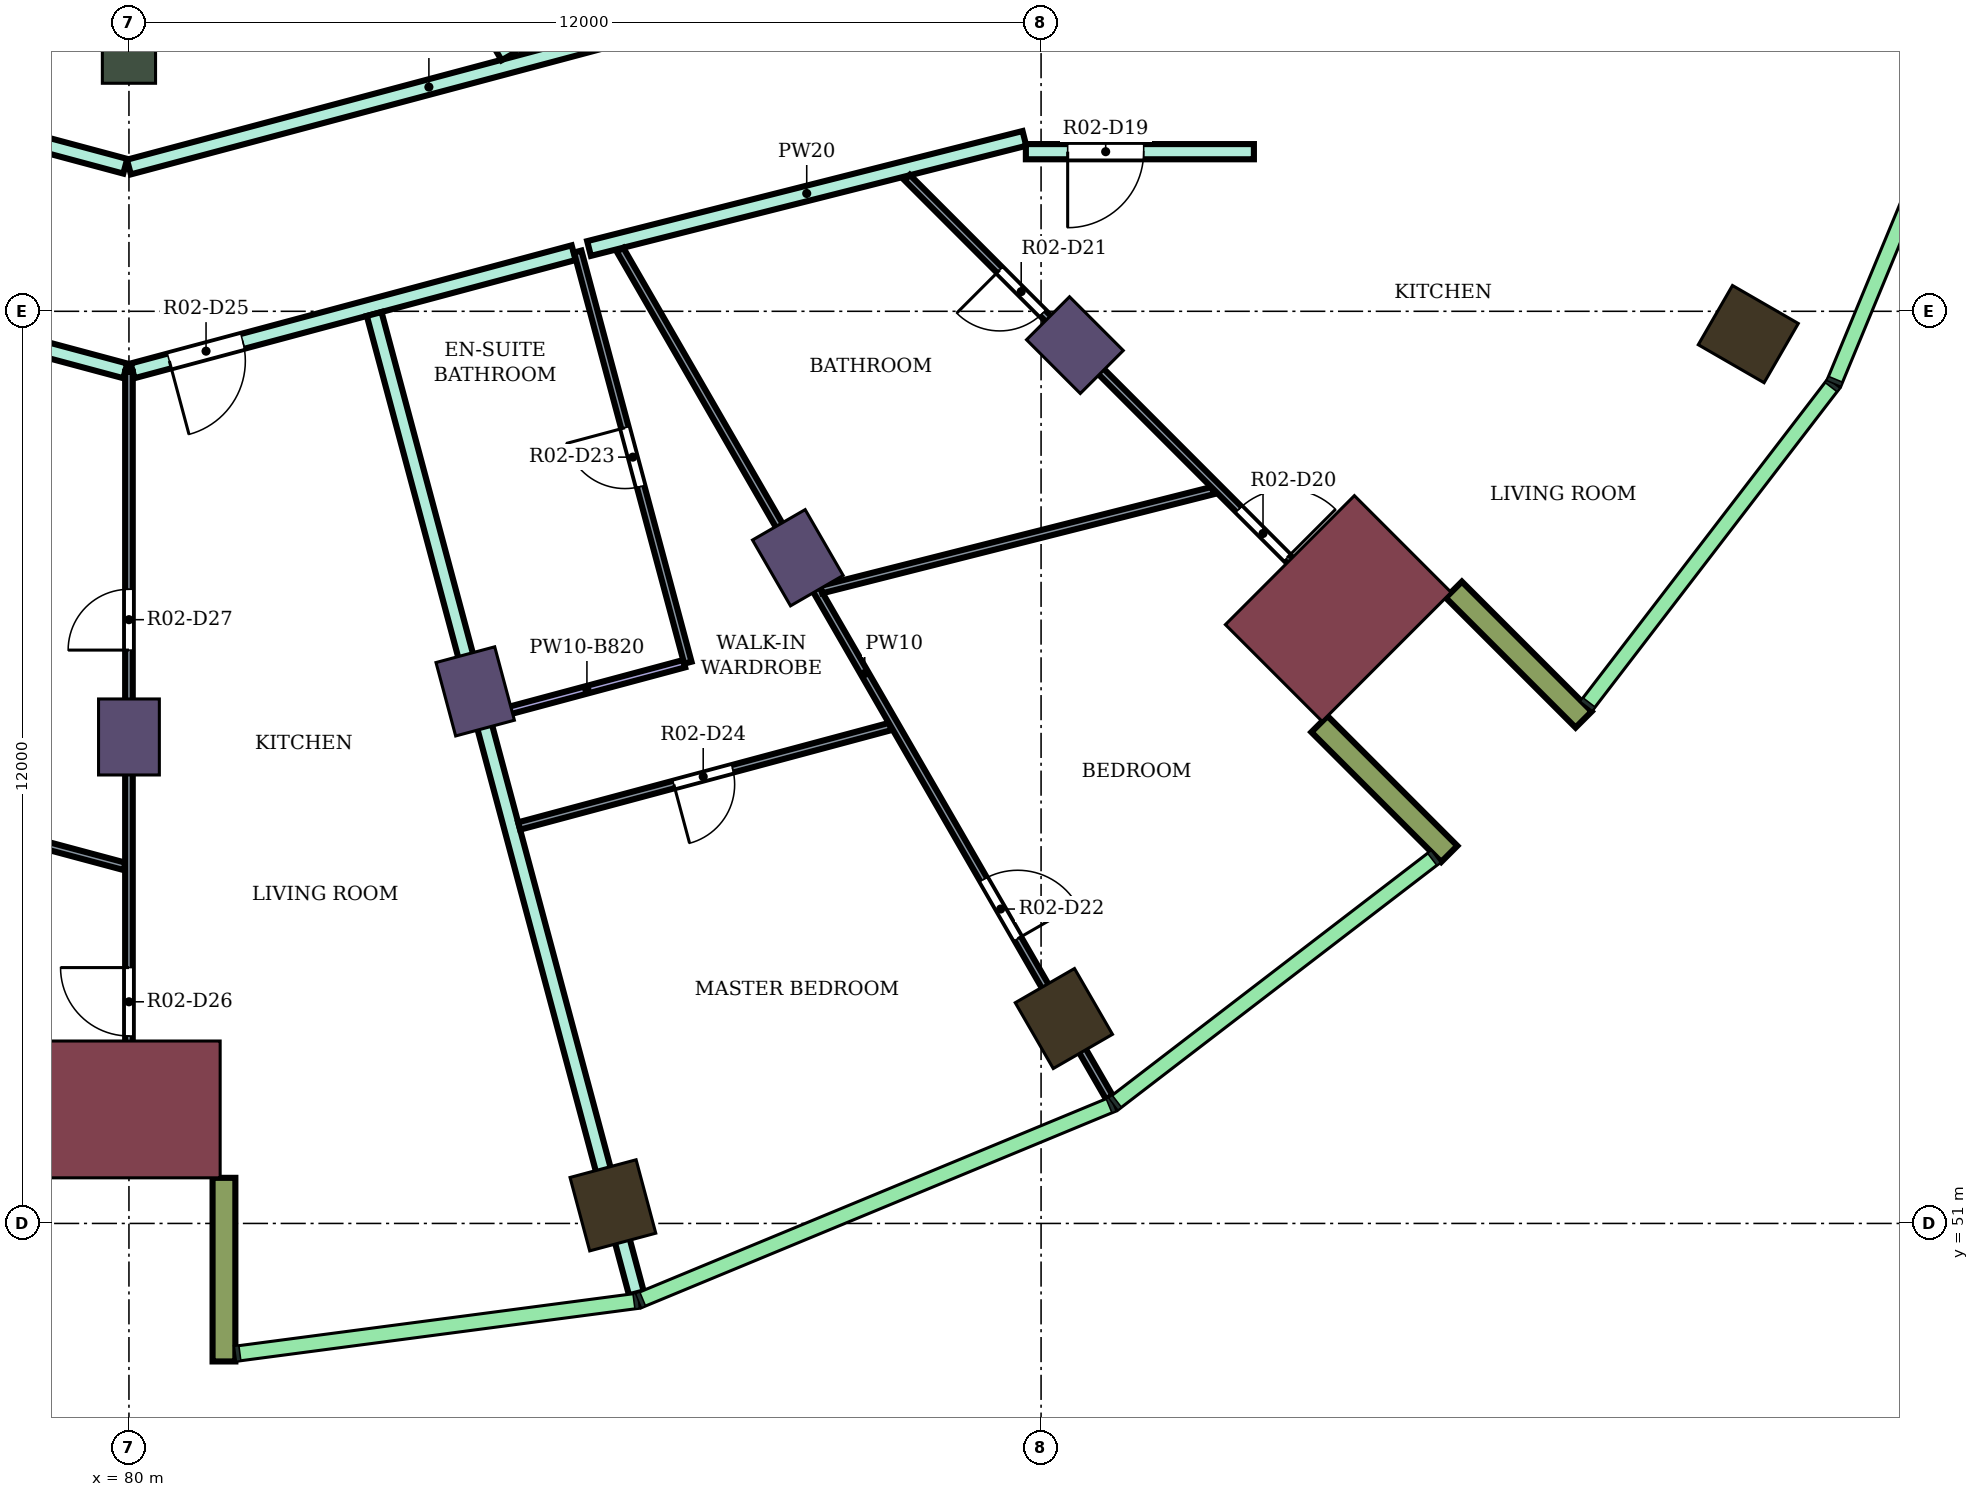
"""IFC4 building model, lengths in metres.
Left out: names, types, materials, properties, quantities, classifications, styles, units other than length and angle.
Written with IfcOpenShell. Run it as: python <this file> out.ifc"""

import sys

from ifc_helpers import new_model, si_unit, direction, frame, frame_2d, origin, origin_2d, place, context, subcontext, project, spatial, rectangle, extrude, element, fill, save


model = new_model("IFC4")
c1 = context("Model", 3, precision=1e-05, world=origin(), true_north=direction((0.0, 1.0)))
c2 = subcontext(c1, "Body", "Model", "MODEL_VIEW")
j1 = project(units=[si_unit("LENGTHUNIT", "METRE"), si_unit("PLANEANGLEUNIT", "RADIAN")], contexts=[c1])
p1 = place(None, origin())
s1 = spatial("IfcSite", under=j1, at=p1, CompositionType="ELEMENT")
p2 = place(p1, origin())
s2 = spatial("IfcBuilding", under=s1, at=p2, CompositionType="ELEMENT")
p3 = place(p2, frame((0.0, 0.0, 174.1)))
s3 = spatial("IfcBuildingStorey", under=s2, at=p3, CompositionType="ELEMENT", Elevation=174.1)
for number, where, z_axis, x_axis in (
    (1, (86.367, 51.238, 0.0), (0.0, 0.0, 1.0), (0.259, -0.966, 0.0)),
    (2, (92.3, 53.696, 0.0), (0.0, 0.0, 1.0), (0.5, -0.866, 0.0)),
    (3, (101.304, 62.7, 0.0), (0.0, 0.0, 1.0), (0.866, -0.5, 0.0)),
):
    element("IfcColumn", number, at=place(p3, frame(where, z_axis=z_axis, x_axis=x_axis)), inside=s3, PredefinedType="COLUMN", context=c2, shape_type="SweptSolid", body=[
        extrude(rectangle(XDim=1.0, YDim=0.9, at=origin_2d()), origin(), (0.0, 0.0, 1.0), 4.1),
    ])
for number, where, z_axis, x_axis in (
    (4, (80.0, 57.4, 0.0), (0.0, 0.0, 1.0), (0.0, -1.0, 0.0)),
    (5, (84.555, 58.0, 0.0), (0.0, 0.0, 1.0), (0.259, -0.966, 0.0)),
    (6, (88.8, 59.758, 0.0), (0.0, 0.0, 1.0), (0.5, -0.866, 0.0)),
    (7, (92.445, 62.555, 0.0), (0.0, 0.0, 1.0), (0.707, -0.707, 0.0)),
):
    element("IfcColumn", number, at=place(p3, frame(where, z_axis=z_axis, x_axis=x_axis)), inside=s3, PredefinedType="COLUMN", context=c2, shape_type="SweptSolid", body=[
        extrude(rectangle(XDim=1.0, YDim=0.8, at=origin_2d()), origin(), (0.0, 0.0, 1.0), 4.1),
    ])
p4 = place(p3, frame((80.0, 66.4, 0.0), z_axis=(0.0, 0.0, 1.0), x_axis=(0.0, -1.0, 0.0)))
e8 = element("IfcColumn", 8, at=p4, inside=s3, PredefinedType="COLUMN", context=c2, shape_type="SweptSolid", body=[
    extrude(rectangle(XDim=0.8, YDim=0.7, at=origin_2d()), origin(), (0.0, 0.0, 1.0), 4.1),
])
for number, where, z_axis, x_axis in (
    (9, (80.0, 52.5, 0.0), (0.0, 0.0, 1.0), (0.0, -1.0, 0.0)),
    (10, (95.91, 59.09, 0.0), (0.0, 0.0, 1.0), (0.707, -0.707, 0.0)),
):
    element("IfcColumn", number, at=place(p3, frame(where, z_axis=z_axis, x_axis=x_axis)), inside=s3, PredefinedType="COLUMN", context=c2, shape_type="SweptSolid", body=[
        extrude(rectangle(XDim=1.8, YDim=2.4, at=origin_2d()), origin(), (0.0, 0.0, 1.0), 4.1),
    ])
for number, where, z_axis, x_axis in (
    (11, (81.25, 51.6, 0.0), (0.0, 0.0, 1.0), (0.0, -1.0, 0.0)),
    (12, (95.662, 57.57, 0.0), (0.0, 0.0, 1.0), (0.707, -0.707, 0.0)),
    (13, (97.43, 59.338, 0.0), (0.0, 0.0, 1.0), (0.707, -0.707, 0.0)),
):
    element("IfcWall", number, at=place(p3, frame(where, z_axis=z_axis, x_axis=x_axis)), inside=s3, PredefinedType="NOTDEFINED", context=c2, shape_type="SweptSolid", body=[
        extrude(rectangle(XDim=2.416, YDim=0.3, at=frame_2d((1.208, 0.0))), origin(), (0.0, 0.0, 1.0), 4.1),
    ])
p5 = place(p3, frame((73.947, 63.826, 0.0), z_axis=(0.0, 0.0, 1.0), x_axis=(0.965908253407, -0.258884619088, 0.0)))
e14 = element("IfcWall", 14, at=p5, inside=s3, PredefinedType="PARTITIONING", context=c2, shape_type="SweptSolid", body=[
    extrude(rectangle(XDim=6.217, YDim=0.2, at=frame_2d((3.108, 0.0))), origin(), (0.0, 0.0, 1.0), 3.65),
])
p6 = place(p5, frame((1.424, 0.0, 0.0)))
e15 = element("IfcOpeningElement", 15, at=p6, cuts=e14, PredefinedType="OPENING", context=c2, shape_type="SweptSolid", body=[
    extrude(rectangle(XDim=1.0, YDim=2.1, at=frame_2d((0.5, 1.05))), frame((0.0, 0.11, 0.0), z_axis=(0.0, -1.0, 0.0), x_axis=(1.0, 0.0, 0.0)), (0.0, 0.0, 1.0), 0.22),
])
p7 = place(p3, frame((74.603, 66.342, 0.0), z_axis=(0.0, 0.0, 1.0), x_axis=(0.965895298152, -0.258932950796, 0.0)))
e16 = element("IfcWall", 16, at=p7, inside=s3, PredefinedType="PARTITIONING", context=c2, shape_type="SweptSolid", body=[
    extrude(rectangle(XDim=5.538, YDim=0.2, at=frame_2d((2.769, 0.0))), origin(), (0.0, 0.0, 1.0), 3.65),
])
p8 = place(p7, frame((2.062, 0.0, 0.0)))
e17 = element("IfcOpeningElement", 17, at=p8, cuts=e16, PredefinedType="OPENING", context=c2, shape_type="SweptSolid", body=[
    extrude(rectangle(XDim=1.8, YDim=2.1, at=frame_2d((0.9, 1.05))), frame((0.0, 0.11, 0.0), z_axis=(0.0, -1.0, 0.0), x_axis=(1.0, 0.0, 0.0)), (0.0, 0.0, 1.0), 0.22),
])
p9 = place(p3, frame((80.0, 64.898, 0.0), z_axis=(0.0, 0.0, 1.0), x_axis=(0.966237419782, 0.257653349704, 0.0)))
e18 = element("IfcWall", 18, at=p9, inside=s3, PredefinedType="PARTITIONING", context=c2, shape_type="SweptSolid", body=[
    extrude(rectangle(XDim=8.169, YDim=0.2, at=frame_2d((4.084, 0.0))), origin(), (0.0, 0.0, 1.0), 3.65),
])
p10 = place(p9, frame((6.428, 0.0, 0.0)))
e19 = element("IfcOpeningElement", 19, at=p10, cuts=e18, PredefinedType="OPENING", context=c2, shape_type="SweptSolid", body=[
    extrude(rectangle(XDim=0.9, YDim=2.1, at=frame_2d((0.45, 1.05))), frame((0.0, 0.11, 0.0), z_axis=(0.0, -1.0, 0.0), x_axis=(1.0, 0.0, 0.0)), (0.0, 0.0, 1.0), 0.22),
])
p11 = place(p3, frame((80.048, 62.217, 0.0), z_axis=(0.0, 0.0, 1.0), x_axis=(0.965941520544, 0.258760466242, 0.0)))
e20 = element("IfcWall", 20, at=p11, inside=s3, PredefinedType="PARTITIONING", context=c2, shape_type="SweptSolid", body=[
    extrude(rectangle(XDim=6.006, YDim=0.2, at=frame_2d((3.003, 0.0))), origin(), (0.0, 0.0, 1.0), 3.65),
])
p12 = place(p11, frame((0.5, 0.0, 0.0)))
e21 = element("IfcOpeningElement", 21, at=p12, cuts=e20, PredefinedType="OPENING", context=c2, shape_type="SweptSolid", body=[
    extrude(rectangle(XDim=1.0, YDim=2.1, at=frame_2d((0.5, 1.05))), frame((0.0, 0.11, 0.0), z_axis=(0.0, -1.0, 0.0), x_axis=(1.0, 0.0, 0.0)), (0.0, 0.0, 1.0), 0.22),
])
p13 = place(p3, frame((83.226, 62.965, 0.0), z_axis=(0.0, 0.0, 1.0), x_axis=(0.258657094602, -0.965969206244, 0.0)))
e22 = element("IfcWall", 22, at=p13, inside=s3, PredefinedType="PARTITIONING", context=c2, shape_type="SweptSolid", body=[
    extrude(rectangle(XDim=13.338, YDim=0.2, at=frame_2d((6.669, 0.0))), origin(), (0.0, 0.0, 1.0), 3.65),
])
p14 = place(p3, frame((83.847, 68.331, 0.0), z_axis=(0.0, 0.0, 1.0), x_axis=(0.499851978358, -0.866110847255, 0.0)))
e23 = element("IfcWall", 23, at=p14, inside=s3, PredefinedType="PARTITIONING", context=c2, shape_type="SweptSolid", body=[
    extrude(rectangle(XDim=2.284, YDim=0.2, at=frame_2d((1.142, 0.0))), origin(), (0.0, 0.0, 1.0), 3.65),
])
p15 = place(p3, frame((86.053, 63.826, 0.0), z_axis=(0.0, 0.0, 1.0), x_axis=(0.969490004987, 0.245130843083, 0.0)))
e24 = element("IfcWall", 24, at=p15, inside=s3, PredefinedType="PARTITIONING", context=c2, shape_type="SweptSolid", body=[
    extrude(rectangle(XDim=5.908, YDim=0.2, at=frame_2d((2.954, 0.0))), origin(), (0.0, 0.0, 1.0), 3.65),
])
p16 = place(p3, frame((91.8, 65.1, 0.0), z_axis=(0.0, 0.0, 1.0), x_axis=(1.0, 0.0, 0.0)))
e25 = element("IfcWall", 25, at=p16, inside=s3, PredefinedType="PARTITIONING", context=c2, shape_type="SweptSolid", body=[
    extrude(rectangle(XDim=3.0, YDim=0.2, at=frame_2d((1.5, 0.0))), origin(), (0.0, 0.0, 1.0), 3.65),
])
p17 = place(p16, frame((0.55, 0.0, 0.0)))
e26 = element("IfcOpeningElement", 26, at=p17, cuts=e25, PredefinedType="OPENING", context=c2, shape_type="SweptSolid", body=[
    extrude(rectangle(XDim=1.0, YDim=2.1, at=frame_2d((0.5, 1.05))), frame((0.0, 0.11, 0.0), z_axis=(0.0, -1.0, 0.0), x_axis=(1.0, 0.0, 0.0)), (0.0, 0.0, 1.0), 0.22),
])
p18 = place(p3, frame((75.267, 56.95, 0.0), z_axis=(0.0, 0.0, 1.0), x_axis=(0.965934541962, -0.258786515577, 0.0)))
e27 = element("IfcWall", 27, at=p18, inside=s3, PredefinedType="PARTITIONING", context=c2, shape_type="SweptSolid", body=[
    extrude(rectangle(XDim=4.84, YDim=0.1, at=frame_2d((2.42, 0.0))), origin(), (0.0, 0.0, 1.0), 3.65),
])
p19 = place(p3, frame((80.0, 51.8, 0.0), z_axis=(0.0, 0.0, 1.0), x_axis=(0.0, 1.0, 0.0)))
e28 = element("IfcWall", 28, at=p19, inside=s3, PredefinedType="PARTITIONING", context=c2, shape_type="SweptSolid", body=[
    extrude(rectangle(XDim=10.404, YDim=0.1, at=frame_2d((5.202, 0.0))), origin(), (0.0, 0.0, 1.0), 3.65),
])
p20 = place(p19, frame((1.666, 0.0, 0.0)))
e29 = element("IfcOpeningElement", 29, at=p20, cuts=e28, PredefinedType="OPENING", context=c2, shape_type="SweptSolid", body=[
    extrude(rectangle(XDim=0.9, YDim=2.1, at=frame_2d((0.45, 1.05))), frame((0.0, 0.06, 0.0), z_axis=(0.0, -1.0, 0.0), x_axis=(1.0, 0.0, 0.0)), (0.0, 0.0, 1.0), 0.12),
])
p21 = place(p19, frame((6.743, 0.0, 0.0)))
e30 = element("IfcOpeningElement", 30, at=p21, cuts=e28, PredefinedType="OPENING", context=c2, shape_type="SweptSolid", body=[
    extrude(rectangle(XDim=0.8, YDim=2.1, at=frame_2d((0.4, 1.05))), frame((0.0, 0.06, 0.0), z_axis=(0.0, -1.0, 0.0), x_axis=(1.0, 0.0, 0.0)), (0.0, 0.0, 1.0), 0.12),
])
p22 = place(p3, frame((84.746, 57.678, 0.0), z_axis=(0.0, 0.0, 1.0), x_axis=(0.965894568086, 0.258935674139, 0.0)))
e31 = element("IfcWall", 31, at=p22, inside=s3, PredefinedType="PARTITIONING", context=c2, shape_type="SweptSolid", body=[
    extrude(rectangle(XDim=2.649, YDim=0.1, at=frame_2d((1.325, 0.0))), origin(), (0.0, 0.0, 1.0), 3.28),
])
p23 = place(p3, frame((85.134, 56.229, 0.0), z_axis=(0.0, 0.0, 1.0), x_axis=(0.965894130068, 0.258937308051, 0.0)))
e32 = element("IfcWall", 32, at=p23, inside=s3, PredefinedType="PARTITIONING", context=c2, shape_type="SweptSolid", body=[
    extrude(rectangle(XDim=5.054, YDim=0.1, at=frame_2d((2.527, 0.0))), origin(), (0.0, 0.0, 1.0), 3.65),
])
p24 = place(p23, frame((2.107, 0.0, 0.0)))
e33 = element("IfcOpeningElement", 33, at=p24, cuts=e32, PredefinedType="OPENING", context=c2, shape_type="SweptSolid", body=[
    extrude(rectangle(XDim=0.8, YDim=2.1, at=frame_2d((0.4, 1.05))), frame((0.0, 0.06, 0.0), z_axis=(0.0, -1.0, 0.0), x_axis=(1.0, 0.0, 0.0)), (0.0, 0.0, 1.0), 0.12),
])
p25 = place(p3, frame((85.904, 63.786, 0.0), z_axis=(0.0, 0.0, 1.0), x_axis=(0.258761510459, -0.965941240814, 0.0)))
e34 = element("IfcWall", 34, at=p25, inside=s3, PredefinedType="PARTITIONING", context=c2, shape_type="SweptSolid", body=[
    extrude(rectangle(XDim=5.6, YDim=0.1, at=frame_2d((2.8, 0.0))), origin(), (0.0, 0.0, 1.0), 3.65),
])
p26 = place(p25, frame((2.4, 0.0, 0.0)))
e35 = element("IfcOpeningElement", 35, at=p26, cuts=e34, PredefinedType="OPENING", context=c2, shape_type="SweptSolid", body=[
    extrude(rectangle(XDim=0.8, YDim=2.1, at=frame_2d((0.4, 1.05))), frame((0.0, 0.06, 0.0), z_axis=(0.0, -1.0, 0.0), x_axis=(1.0, 0.0, 0.0)), (0.0, 0.0, 1.0), 0.12),
])
p27 = place(p3, frame((86.461, 63.81, 0.0), z_axis=(0.0, 0.0, 1.0), x_axis=(0.49994840431, -0.866055190521, 0.0)))
e36 = element("IfcWall", 36, at=p27, inside=s3, PredefinedType="PARTITIONING", context=c2, shape_type="SweptSolid", body=[
    extrude(rectangle(XDim=12.876, YDim=0.1, at=frame_2d((6.438, 0.0))), origin(), (0.0, 0.0, 1.0), 3.65),
])
p28 = place(p27, frame((9.565, 0.0, 0.0)))
e37 = element("IfcOpeningElement", 37, at=p28, cuts=e36, PredefinedType="OPENING", context=c2, shape_type="SweptSolid", body=[
    extrude(rectangle(XDim=0.9, YDim=2.1, at=frame_2d((0.45, 1.05))), frame((0.0, 0.06, 0.0), z_axis=(0.0, -1.0, 0.0), x_axis=(1.0, 0.0, 0.0)), (0.0, 0.0, 1.0), 0.12),
])
p29 = place(p3, frame((89.109, 59.339, 0.0), z_axis=(0.0, 0.0, 1.0), x_axis=(0.969449434389, 0.245291243552, 0.0)))
e38 = element("IfcWall", 38, at=p29, inside=s3, PredefinedType="PARTITIONING", context=c2, shape_type="SweptSolid", body=[
    extrude(rectangle(XDim=5.314, YDim=0.1, at=frame_2d((2.657, 0.0))), origin(), (0.0, 0.0, 1.0), 3.65),
])
p30 = place(p3, frame((90.238, 64.76, 0.0), z_axis=(0.0, 0.0, 1.0), x_axis=(0.707022780144, -0.707190772251, 0.0)))
e39 = element("IfcWall", 39, at=p30, inside=s3, PredefinedType="PARTITIONING", context=c2, shape_type="SweptSolid", body=[
    extrude(rectangle(XDim=8.72, YDim=0.1, at=frame_2d((4.36, 0.0))), origin(), (0.0, 0.0, 1.0), 3.65),
])
p31 = place(p30, frame((6.172, 0.0, 0.0)))
e40 = element("IfcOpeningElement", 40, at=p31, cuts=e39, PredefinedType="OPENING", context=c2, shape_type="SweptSolid", body=[
    extrude(rectangle(XDim=0.9, YDim=2.1, at=frame_2d((0.45, 1.05))), frame((0.0, 0.06, 0.0), z_axis=(0.0, -1.0, 0.0), x_axis=(1.0, 0.0, 0.0)), (0.0, 0.0, 1.0), 0.12),
])
p32 = place(p30, frame((1.722, 0.0, 0.0)))
e41 = element("IfcOpeningElement", 41, at=p32, cuts=e39, PredefinedType="OPENING", context=c2, shape_type="SweptSolid", body=[
    extrude(rectangle(XDim=0.8, YDim=2.1, at=frame_2d((0.4, 1.05))), frame((0.0, 0.06, 0.0), z_axis=(0.0, -1.0, 0.0), x_axis=(1.0, 0.0, 0.0)), (0.0, 0.0, 1.0), 0.12),
])
p33 = place(p17, frame((1.0, 0.0, 0.0), z_axis=(0.0, 0.0, 1.0), x_axis=(-1.0, 0.0, 0.0)))
e42 = element("IfcDoor", 42, at=p33, inside=s3, OperationType="SINGLE_SWING_RIGHT", PredefinedType="DOOR", context=c2, shape_type="SweptSolid", body=[
    extrude(rectangle(XDim=1.0, YDim=2.1, at=frame_2d((0.5, 1.05))), frame((0.0, 0.025, 0.0), z_axis=(0.0, -1.0, 0.0), x_axis=(1.0, 0.0, 0.0)), (0.0, 0.0, 1.0), 0.05),
])
fill(e26, e42)
p34 = place(p31, origin())
e43 = element("IfcDoor", 43, at=p34, inside=s3, OperationType="SINGLE_SWING_RIGHT", PredefinedType="DOOR", context=c2, shape_type="SweptSolid", body=[
    extrude(rectangle(XDim=0.9, YDim=2.1, at=frame_2d((0.45, 1.05))), frame((0.0, 0.025, 0.0), z_axis=(0.0, -1.0, 0.0), x_axis=(1.0, 0.0, 0.0)), (0.0, 0.0, 1.0), 0.05),
])
fill(e40, e43)
p35 = place(p32, frame((0.8, 0.0, 0.0), z_axis=(0.0, 0.0, 1.0), x_axis=(-1.0, 0.0, 0.0)))
e44 = element("IfcDoor", 44, at=p35, inside=s3, OperationType="SINGLE_SWING_RIGHT", PredefinedType="DOOR", context=c2, shape_type="SweptSolid", body=[
    extrude(rectangle(XDim=0.8, YDim=2.1, at=frame_2d((0.4, 1.05))), frame((0.0, 0.025, 0.0), z_axis=(0.0, -1.0, 0.0), x_axis=(1.0, 0.0, 0.0)), (0.0, 0.0, 1.0), 0.05),
])
fill(e41, e44)
p36 = place(p28, origin())
e45 = element("IfcDoor", 45, at=p36, inside=s3, OperationType="SINGLE_SWING_RIGHT", PredefinedType="DOOR", context=c2, shape_type="SweptSolid", body=[
    extrude(rectangle(XDim=0.9, YDim=2.1, at=frame_2d((0.45, 1.05))), frame((0.0, 0.025, 0.0), z_axis=(0.0, -1.0, 0.0), x_axis=(1.0, 0.0, 0.0)), (0.0, 0.0, 1.0), 0.05),
])
fill(e37, e45)
p37 = place(p26, frame((0.8, 0.0, 0.0), z_axis=(0.0, 0.0, 1.0), x_axis=(-1.0, 0.0, 0.0)))
e46 = element("IfcDoor", 46, at=p37, inside=s3, OperationType="SINGLE_SWING_RIGHT", PredefinedType="DOOR", context=c2, shape_type="SweptSolid", body=[
    extrude(rectangle(XDim=0.8, YDim=2.1, at=frame_2d((0.4, 1.05))), frame((0.0, 0.025, 0.0), z_axis=(0.0, -1.0, 0.0), x_axis=(1.0, 0.0, 0.0)), (0.0, 0.0, 1.0), 0.05),
])
fill(e35, e46)
p38 = place(p24, frame((0.8, 0.0, 0.0), z_axis=(0.0, 0.0, 1.0), x_axis=(-1.0, 0.0, 0.0)))
e47 = element("IfcDoor", 47, at=p38, inside=s3, OperationType="SINGLE_SWING_RIGHT", PredefinedType="DOOR", context=c2, shape_type="SweptSolid", body=[
    extrude(rectangle(XDim=0.8, YDim=2.1, at=frame_2d((0.4, 1.05))), frame((0.0, 0.025, 0.0), z_axis=(0.0, -1.0, 0.0), x_axis=(1.0, 0.0, 0.0)), (0.0, 0.0, 1.0), 0.05),
])
fill(e33, e47)
p39 = place(p12, frame((1.0, 0.0, 0.0), z_axis=(0.0, 0.0, 1.0), x_axis=(-1.0, 0.0, 0.0)))
e48 = element("IfcDoor", 48, at=p39, inside=s3, OperationType="SINGLE_SWING_RIGHT", PredefinedType="DOOR", context=c2, shape_type="SweptSolid", body=[
    extrude(rectangle(XDim=1.0, YDim=2.1, at=frame_2d((0.5, 1.05))), frame((0.0, 0.025, 0.0), z_axis=(0.0, -1.0, 0.0), x_axis=(1.0, 0.0, 0.0)), (0.0, 0.0, 1.0), 0.05),
])
fill(e21, e48)
p40 = place(p20, origin())
e49 = element("IfcDoor", 49, at=p40, inside=s3, OperationType="SINGLE_SWING_RIGHT", PredefinedType="DOOR", context=c2, shape_type="SweptSolid", body=[
    extrude(rectangle(XDim=0.9, YDim=2.1, at=frame_2d((0.45, 1.05))), frame((0.0, 0.025, 0.0), z_axis=(0.0, -1.0, 0.0), x_axis=(1.0, 0.0, 0.0)), (0.0, 0.0, 1.0), 0.05),
])
fill(e29, e49)
p41 = place(p21, origin())
e50 = element("IfcDoor", 50, at=p41, inside=s3, OperationType="SINGLE_SWING_LEFT", PredefinedType="DOOR", context=c2, shape_type="SweptSolid", body=[
    extrude(rectangle(XDim=0.8, YDim=2.1, at=frame_2d((0.4, 1.05))), frame((0.0, 0.025, 0.0), z_axis=(0.0, -1.0, 0.0), x_axis=(1.0, 0.0, 0.0)), (0.0, 0.0, 1.0), 0.05),
])
fill(e30, e50)
save(model, sys.argv[1])
